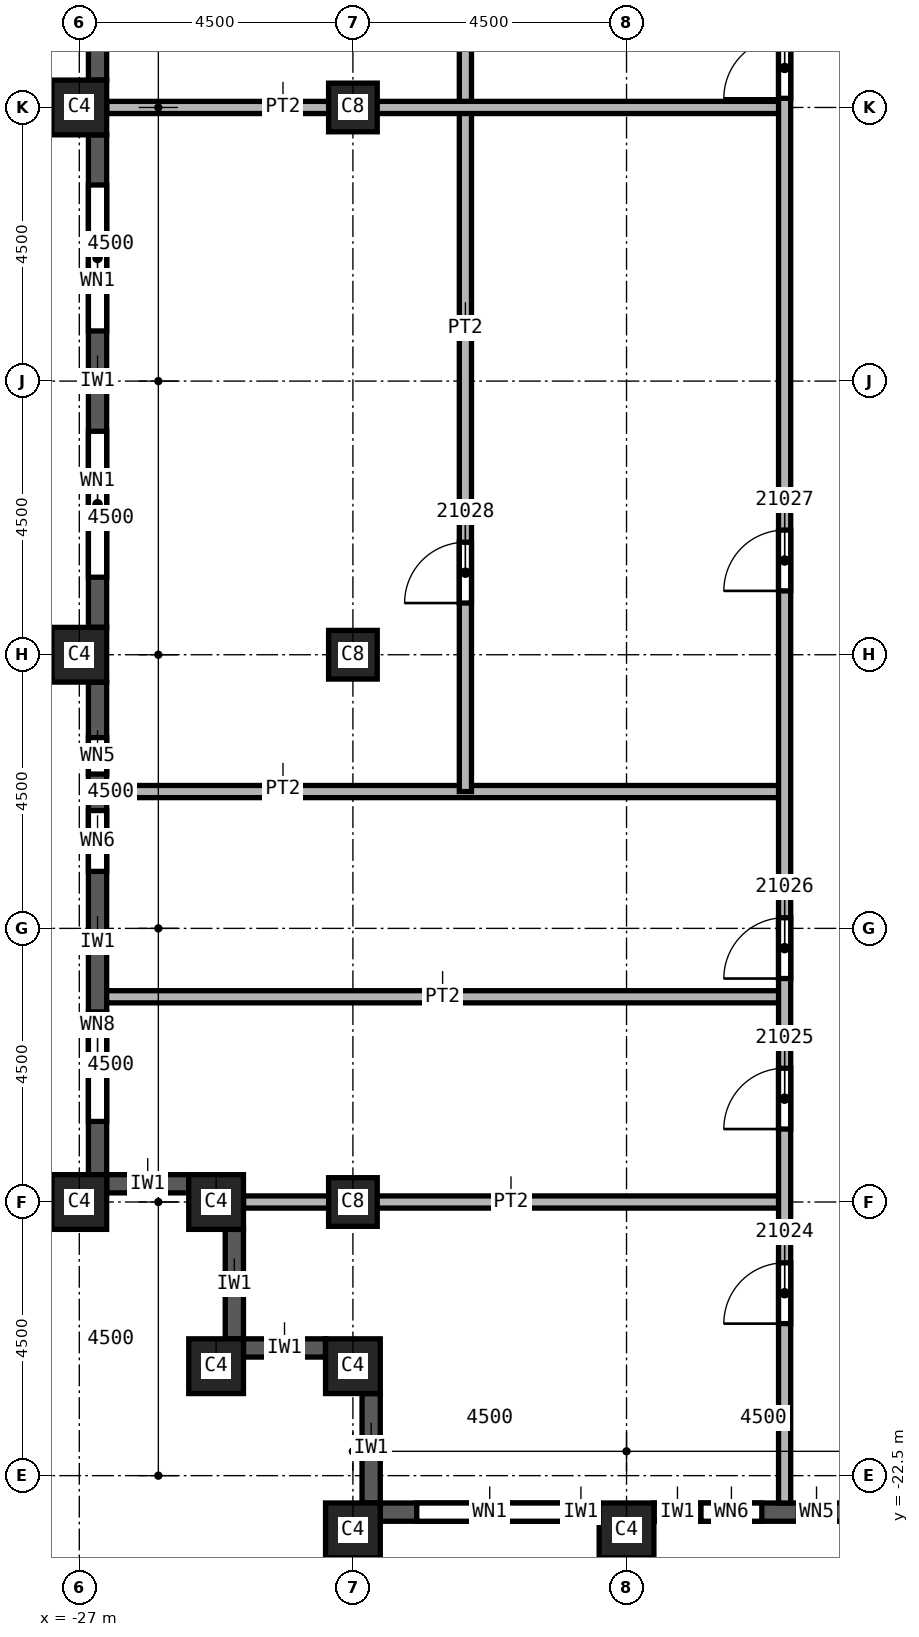
"""IFC4 building model, lengths in metres.
Left out: names, types, materials, properties, quantities, classifications, styles, units other than length and angle.
Written with IfcOpenShell. Run it as: python <this file> out.ifc"""

import sys

from ifc_helpers import new_model, si_unit, direction, frame, frame_2d, origin, origin_2d, place, context, subcontext, project, spatial, rectangle, extrude, element, fill, save


model = new_model("IFC4")
c1 = context("Model", 3, precision=1e-05, world=origin(), true_north=direction((0.0, 1.0)))
c2 = subcontext(c1, "Body", "Model", "MODEL_VIEW")
j1 = project(units=[si_unit("LENGTHUNIT", "METRE"), si_unit("PLANEANGLEUNIT", "RADIAN")], contexts=[c1])
p1 = place(None, origin())
s1 = spatial("IfcSite", under=j1, at=p1, CompositionType="ELEMENT")
p2 = place(p1, origin())
s2 = spatial("IfcBuilding", under=s1, at=p2, CompositionType="ELEMENT")
p3 = place(p2, frame((0.0, 0.0, 300.0)))
s3 = spatial("IfcBuildingStorey", under=s2, at=p3, CompositionType="ELEMENT", Elevation=300.0)
for number, where, z_axis, x_axis in (
    (1, (-22.5, 0.0, 0.0), (0.0, 0.0, 1.0), (1.0, 0.0, 0.0)),
    (2, (-22.5, -9.0, 0.0), (0.0, 0.0, 1.0), (1.0, 0.0, 0.0)),
    (3, (-22.5, -18.0, 0.0), (0.0, 0.0, 1.0), (1.0, 0.0, 0.0)),
):
    element("IfcColumn", number, at=place(p3, frame(where, z_axis=z_axis, x_axis=x_axis)), inside=s3, PredefinedType="COLUMN", context=c2, shape_type="SweptSolid", body=[
        extrude(rectangle(XDim=0.8, YDim=0.8, at=origin_2d()), origin(), (0.0, 0.0, 1.0), 3.74),
    ])
for number, where, z_axis, x_axis in (
    (4, (-18.0, -23.4, 0.0), (0.0, 0.0, 1.0), (1.0, 0.0, 0.0)),
    (5, (-22.5, -23.4, 0.0), (0.0, 0.0, 1.0), (1.0, 0.0, 0.0)),
    (6, (-27.0, 0.0, 0.0), (0.0, 0.0, 1.0), (0.0, 1.0, 0.0)),
    (7, (-27.0, -9.0, 0.0), (0.0, 0.0, 1.0), (0.0, 1.0, 0.0)),
    (8, (-27.0, -18.0, 0.0), (0.0, 0.0, 1.0), (0.0, 1.0, 0.0)),
    (9, (-22.5, -20.7, 0.0), (0.0, 0.0, 1.0), (1.0, 0.0, 0.0)),
    (10, (-24.75, -20.7, 0.0), (0.0, 0.0, 1.0), (1.0, 0.0, 0.0)),
    (11, (-24.75, -18.0, 0.0), (0.0, 0.0, 1.0), (1.0, 0.0, 0.0)),
):
    element("IfcColumn", number, at=place(p3, frame(where, z_axis=z_axis, x_axis=x_axis)), inside=s3, PredefinedType="COLUMN", context=c2, shape_type="SweptSolid", body=[
        extrude(rectangle(XDim=0.9, YDim=0.9, at=origin_2d()), origin(), (0.0, 0.0, 1.0), 3.74),
    ])
p4 = place(p3, frame((-26.7, 8.55, 0.0), z_axis=(0.0, 0.0, 1.0), x_axis=(0.0, -1.0, 0.0)))
e12 = element("IfcWall", 12, at=p4, inside=s3, PredefinedType="SOLIDWALL", context=c2, shape_type="SweptSolid", body=[
    extrude(rectangle(XDim=8.1, YDim=0.3, at=frame_2d((4.05, 0.0))), origin(), (0.0, 0.0, 1.0), 3.14),
])
p5 = place(p4, frame((4.875, 0.0, 0.8)))
e13 = element("IfcOpeningElement", 13, at=p5, cuts=e12, PredefinedType="OPENING", context=c2, shape_type="SweptSolid", body=[
    extrude(rectangle(XDim=2.4, YDim=1.95, at=frame_2d((1.2, 0.975))), frame((0.0, 0.15, 0.0), z_axis=(0.0, -1.0, 0.0), x_axis=(1.0, 0.0, 0.0)), (0.0, 0.0, 1.0), 0.3),
])
p6 = place(p4, frame((0.913, 0.0, 0.8)))
e14 = element("IfcOpeningElement", 14, at=p6, cuts=e12, PredefinedType="OPENING", context=c2, shape_type="SweptSolid", body=[
    extrude(rectangle(XDim=0.6, YDim=1.95, at=frame_2d((0.3, 0.975))), frame((0.0, 0.15, 0.0), z_axis=(0.0, -1.0, 0.0), x_axis=(1.0, 0.0, 0.0)), (0.0, 0.0, 1.0), 0.3),
])
p7 = place(p4, frame((2.113, 0.0, 0.8)))
e15 = element("IfcOpeningElement", 15, at=p7, cuts=e12, PredefinedType="OPENING", context=c2, shape_type="SweptSolid", body=[
    extrude(rectangle(XDim=1.0, YDim=1.95, at=frame_2d((0.5, 0.975))), frame((0.0, 0.15, 0.0), z_axis=(0.0, -1.0, 0.0), x_axis=(1.0, 0.0, 0.0)), (0.0, 0.0, 1.0), 0.3),
])
p8 = place(p3, frame((-26.7, -0.45, 0.0), z_axis=(0.0, 0.0, 1.0), x_axis=(0.0, -1.0, 0.0)))
e16 = element("IfcWall", 16, at=p8, inside=s3, PredefinedType="SOLIDWALL", context=c2, shape_type="SweptSolid", body=[
    extrude(rectangle(XDim=8.1, YDim=0.3, at=frame_2d((4.05, 0.0))), origin(), (0.0, 0.0, 1.0), 3.14),
])
p9 = place(p8, frame((0.825, 0.0, 0.8)))
e17 = element("IfcOpeningElement", 17, at=p9, cuts=e16, PredefinedType="OPENING", context=c2, shape_type="SweptSolid", body=[
    extrude(rectangle(XDim=2.4, YDim=1.95, at=frame_2d((1.2, 0.975))), frame((0.0, 0.15, 0.0), z_axis=(0.0, -1.0, 0.0), x_axis=(1.0, 0.0, 0.0)), (0.0, 0.0, 1.0), 0.3),
])
p10 = place(p8, frame((4.875, 0.0, 0.8)))
e18 = element("IfcOpeningElement", 18, at=p10, cuts=e16, PredefinedType="OPENING", context=c2, shape_type="SweptSolid", body=[
    extrude(rectangle(XDim=2.4, YDim=1.95, at=frame_2d((1.2, 0.975))), frame((0.0, 0.15, 0.0), z_axis=(0.0, -1.0, 0.0), x_axis=(1.0, 0.0, 0.0)), (0.0, 0.0, 1.0), 0.3),
])
p11 = place(p3, frame((-26.7, -9.45, 0.0), z_axis=(0.0, 0.0, 1.0), x_axis=(0.0, -1.0, 0.0)))
e19 = element("IfcWall", 19, at=p11, inside=s3, PredefinedType="SOLIDWALL", context=c2, shape_type="SweptSolid", body=[
    extrude(rectangle(XDim=8.1, YDim=0.3, at=frame_2d((4.05, 0.0))), origin(), (0.0, 0.0, 1.0), 3.14),
])
p12 = place(p11, frame((0.913, 0.0, 0.8)))
e20 = element("IfcOpeningElement", 20, at=p12, cuts=e19, PredefinedType="OPENING", context=c2, shape_type="SweptSolid", body=[
    extrude(rectangle(XDim=0.6, YDim=1.95, at=frame_2d((0.3, 0.975))), frame((0.0, 0.15, 0.0), z_axis=(0.0, -1.0, 0.0), x_axis=(1.0, 0.0, 0.0)), (0.0, 0.0, 1.0), 0.3),
])
p13 = place(p11, frame((2.113, 0.0, 0.8)))
e21 = element("IfcOpeningElement", 21, at=p13, cuts=e19, PredefinedType="OPENING", context=c2, shape_type="SweptSolid", body=[
    extrude(rectangle(XDim=1.0, YDim=1.95, at=frame_2d((0.5, 0.975))), frame((0.0, 0.15, 0.0), z_axis=(0.0, -1.0, 0.0), x_axis=(1.0, 0.0, 0.0)), (0.0, 0.0, 1.0), 0.3),
])
p14 = place(p11, frame((5.425, 0.0, 0.8)))
e22 = element("IfcOpeningElement", 22, at=p14, cuts=e19, PredefinedType="OPENING", context=c2, shape_type="SweptSolid", body=[
    extrude(rectangle(XDim=1.8, YDim=1.95, at=frame_2d((0.9, 0.975))), frame((0.0, 0.15, 0.0), z_axis=(0.0, -1.0, 0.0), x_axis=(1.0, 0.0, 0.0)), (0.0, 0.0, 1.0), 0.3),
])
p15 = place(p3, frame((-26.55, -17.7, 0.0), z_axis=(0.0, 0.0, 1.0), x_axis=(1.0, 0.0, 0.0)))
e23 = element("IfcWall", 23, at=p15, inside=s3, PredefinedType="SOLIDWALL", context=c2, shape_type="SweptSolid", body=[
    extrude(rectangle(XDim=1.35, YDim=0.3, at=frame_2d((0.675, 0.0))), origin(), (0.0, 0.0, 1.0), 3.14),
])
p16 = place(p3, frame((-24.45, -18.45, 0.0), z_axis=(0.0, 0.0, 1.0), x_axis=(0.0, -1.0, 0.0)))
e24 = element("IfcWall", 24, at=p16, inside=s3, PredefinedType="SOLIDWALL", context=c2, shape_type="SweptSolid", body=[
    extrude(rectangle(XDim=1.8, YDim=0.3, at=frame_2d((0.9, 0.0))), origin(), (0.0, 0.0, 1.0), 3.14),
])
p17 = place(p3, frame((-24.3, -20.4, 0.0), z_axis=(0.0, 0.0, 1.0), x_axis=(1.0, 0.0, 0.0)))
e25 = element("IfcWall", 25, at=p17, inside=s3, PredefinedType="SOLIDWALL", context=c2, shape_type="SweptSolid", body=[
    extrude(rectangle(XDim=1.35, YDim=0.3, at=frame_2d((0.675, 0.0))), origin(), (0.0, 0.0, 1.0), 3.14),
])
p18 = place(p3, frame((-22.2, -21.15, 0.0), z_axis=(0.0, 0.0, 1.0), x_axis=(0.0, -1.0, 0.0)))
e26 = element("IfcWall", 26, at=p18, inside=s3, PredefinedType="SOLIDWALL", context=c2, shape_type="SweptSolid", body=[
    extrude(rectangle(XDim=1.8, YDim=0.3, at=frame_2d((0.9, 0.0))), origin(), (0.0, 0.0, 1.0), 3.14),
])
p19 = place(p3, frame((-22.05, -23.1, 0.0), z_axis=(0.0, 0.0, 1.0), x_axis=(1.0, 0.0, 0.0)))
e27 = element("IfcWall", 27, at=p19, inside=s3, PredefinedType="SOLIDWALL", context=c2, shape_type="SweptSolid", body=[
    extrude(rectangle(XDim=3.6, YDim=0.3, at=frame_2d((1.8, 0.0))), origin(), (0.0, 0.0, 1.0), 3.14),
])
p20 = place(p19, frame((0.6, 0.0, 0.8)))
e28 = element("IfcOpeningElement", 28, at=p20, cuts=e27, PredefinedType="OPENING", context=c2, shape_type="SweptSolid", body=[
    extrude(rectangle(XDim=2.4, YDim=1.95, at=frame_2d((1.2, 0.975))), frame((0.0, 0.15, 0.0), z_axis=(0.0, -1.0, 0.0), x_axis=(1.0, 0.0, 0.0)), (0.0, 0.0, 1.0), 0.3),
])
p21 = place(p3, frame((-17.55, -23.1, 0.0), z_axis=(0.0, 0.0, 1.0), x_axis=(1.0, 0.0, 0.0)))
e29 = element("IfcWall", 29, at=p21, inside=s3, PredefinedType="SOLIDWALL", context=c2, shape_type="SweptSolid", body=[
    extrude(rectangle(XDim=3.6, YDim=0.3, at=frame_2d((1.8, 0.0))), origin(), (0.0, 0.0, 1.0), 3.14),
])
p22 = place(p21, frame((0.775, 0.0, 0.8)))
e30 = element("IfcOpeningElement", 30, at=p22, cuts=e29, PredefinedType="OPENING", context=c2, shape_type="SweptSolid", body=[
    extrude(rectangle(XDim=1.0, YDim=1.95, at=frame_2d((0.5, 0.975))), frame((0.0, 0.15, 0.0), z_axis=(0.0, -1.0, 0.0), x_axis=(1.0, 0.0, 0.0)), (0.0, 0.0, 1.0), 0.3),
])
p23 = place(p21, frame((2.375, 0.0, 0.8)))
e31 = element("IfcOpeningElement", 31, at=p23, cuts=e29, PredefinedType="OPENING", context=c2, shape_type="SweptSolid", body=[
    extrude(rectangle(XDim=0.6, YDim=1.95, at=frame_2d((0.3, 0.975))), frame((0.0, 0.15, 0.0), z_axis=(0.0, -1.0, 0.0), x_axis=(1.0, 0.0, 0.0)), (0.0, 0.0, 1.0), 0.3),
])
for number, where, z_axis, x_axis in (
    (32, (-26.55, -14.625, 0.0), (0.0, 0.0, 1.0), (1.0, 0.0, 0.0)),
    (33, (-26.55, -11.25, 0.0), (0.0, 0.0, 1.0), (1.0, 0.0, 0.0)),
):
    element("IfcWall", number, at=place(p3, frame(where, z_axis=z_axis, x_axis=x_axis)), inside=s3, PredefinedType="PARTITIONING", context=c2, shape_type="SweptSolid", body=[
        extrude(rectangle(XDim=11.15, YDim=0.2, at=frame_2d((5.575, 0.0))), origin(), (0.0, 0.0, 1.0), 3.74),
    ])
p24 = place(p3, frame((-24.3, -18.0, 0.0), z_axis=(0.0, 0.0, 1.0), x_axis=(1.0, 0.0, 0.0)))
e34 = element("IfcWall", 34, at=p24, inside=s3, PredefinedType="PARTITIONING", context=c2, shape_type="SweptSolid", body=[
    extrude(rectangle(XDim=8.9, YDim=0.2, at=frame_2d((4.45, 0.0))), origin(), (0.0, 0.0, 1.0), 3.74),
])
p25 = place(p3, frame((-20.65, -11.25, 0.0), z_axis=(0.0, 0.0, 1.0), x_axis=(0.0, 1.0, 0.0)))
e35 = element("IfcWall", 35, at=p25, inside=s3, PredefinedType="PARTITIONING", context=c2, shape_type="SweptSolid", body=[
    extrude(rectangle(XDim=18.1, YDim=0.2, at=frame_2d((9.05, 0.0))), origin(), (0.0, 0.0, 1.0), 3.74),
])
p26 = place(p25, frame((16.8, 0.0, 0.0)))
e36 = element("IfcOpeningElement", 36, at=p26, cuts=e35, PredefinedType="OPENING", context=c2, shape_type="SweptSolid", body=[
    extrude(rectangle(XDim=1.0, YDim=2.1, at=frame_2d((0.5, 1.05))), frame((0.0, 0.1, 0.0), z_axis=(0.0, -1.0, 0.0), x_axis=(1.0, 0.0, 0.0)), (0.0, 0.0, 1.0), 0.2),
])
p27 = place(p25, frame((3.1, 0.0, 0.0)))
e37 = element("IfcOpeningElement", 37, at=p27, cuts=e35, PredefinedType="OPENING", context=c2, shape_type="SweptSolid", body=[
    extrude(rectangle(XDim=1.0, YDim=2.1, at=frame_2d((0.5, 1.05))), frame((0.0, 0.1, 0.0), z_axis=(0.0, -1.0, 0.0), x_axis=(1.0, 0.0, 0.0)), (0.0, 0.0, 1.0), 0.2),
])
p28 = place(p3, frame((-15.4, 0.0, 0.0), z_axis=(0.0, 0.0, 1.0), x_axis=(-1.0, 0.0, 0.0)))
e38 = element("IfcWall", 38, at=p28, inside=s3, PredefinedType="PARTITIONING", context=c2, shape_type="SweptSolid", body=[
    extrude(rectangle(XDim=11.15, YDim=0.2, at=frame_2d((5.575, 0.0))), origin(), (0.0, 0.0, 1.0), 3.74),
])
p29 = place(p3, frame((-15.4, -22.95, 0.0), z_axis=(0.0, 0.0, 1.0), x_axis=(0.0, 1.0, 0.0)))
e39 = element("IfcWall", 39, at=p29, inside=s3, PredefinedType="PARTITIONING", context=c2, shape_type="SweptSolid", body=[
    extrude(rectangle(XDim=36.55, YDim=0.2, at=frame_2d((18.275, 0.0))), origin(), (0.0, 0.0, 1.0), 3.74),
])
p30 = place(p29, frame((23.1, 0.0, 0.0)))
e40 = element("IfcOpeningElement", 40, at=p30, cuts=e39, PredefinedType="OPENING", context=c2, shape_type="SweptSolid", body=[
    extrude(rectangle(XDim=1.0, YDim=2.1, at=frame_2d((0.5, 1.05))), frame((0.0, 0.1, 0.0), z_axis=(0.0, -1.0, 0.0), x_axis=(1.0, 0.0, 0.0)), (0.0, 0.0, 1.0), 0.2),
])
p31 = place(p29, frame((34.35, 0.0, 0.0)))
e41 = element("IfcOpeningElement", 41, at=p31, cuts=e39, PredefinedType="OPENING", context=c2, shape_type="SweptSolid", body=[
    extrude(rectangle(XDim=1.0, YDim=2.1, at=frame_2d((0.5, 1.05))), frame((0.0, 0.1, 0.0), z_axis=(0.0, -1.0, 0.0), x_axis=(1.0, 0.0, 0.0)), (0.0, 0.0, 1.0), 0.2),
])
p32 = place(p29, frame((2.95, 0.0, 0.0)))
e42 = element("IfcOpeningElement", 42, at=p32, cuts=e39, PredefinedType="OPENING", context=c2, shape_type="SweptSolid", body=[
    extrude(rectangle(XDim=1.0, YDim=2.1, at=frame_2d((0.5, 1.05))), frame((0.0, 0.1, 0.0), z_axis=(0.0, -1.0, 0.0), x_axis=(1.0, 0.0, 0.0)), (0.0, 0.0, 1.0), 0.2),
])
p33 = place(p29, frame((6.15, 0.0, 0.0)))
e43 = element("IfcOpeningElement", 43, at=p33, cuts=e39, PredefinedType="OPENING", context=c2, shape_type="SweptSolid", body=[
    extrude(rectangle(XDim=1.0, YDim=2.1, at=frame_2d((0.5, 1.05))), frame((0.0, 0.1, 0.0), z_axis=(0.0, -1.0, 0.0), x_axis=(1.0, 0.0, 0.0)), (0.0, 0.0, 1.0), 0.2),
])
p34 = place(p29, frame((8.625, 0.0, 0.0)))
e44 = element("IfcOpeningElement", 44, at=p34, cuts=e39, PredefinedType="OPENING", context=c2, shape_type="SweptSolid", body=[
    extrude(rectangle(XDim=1.0, YDim=2.1, at=frame_2d((0.5, 1.05))), frame((0.0, 0.1, 0.0), z_axis=(0.0, -1.0, 0.0), x_axis=(1.0, 0.0, 0.0)), (0.0, 0.0, 1.0), 0.2),
])
p35 = place(p29, frame((15.0, 0.0, 0.0)))
e45 = element("IfcOpeningElement", 45, at=p35, cuts=e39, PredefinedType="OPENING", context=c2, shape_type="SweptSolid", body=[
    extrude(rectangle(XDim=1.0, YDim=2.1, at=frame_2d((0.5, 1.05))), frame((0.0, 0.1, 0.0), z_axis=(0.0, -1.0, 0.0), x_axis=(1.0, 0.0, 0.0)), (0.0, 0.0, 1.0), 0.2),
])
p36 = place(p9, origin())
e46 = element("IfcWindow", 46, at=p36, inside=s3, PartitioningType="SINGLE_PANEL", PredefinedType="WINDOW", context=c2, shape_type="SweptSolid", body=[
    extrude(rectangle(XDim=2.4, YDim=1.95, at=frame_2d((1.2, 0.975))), frame((0.0, 0.03, 0.0), z_axis=(0.0, -1.0, 0.0), x_axis=(1.0, 0.0, 0.0)), (0.0, 0.0, 1.0), 0.06),
])
fill(e17, e46)
p37 = place(p10, origin())
e47 = element("IfcWindow", 47, at=p37, inside=s3, PartitioningType="SINGLE_PANEL", PredefinedType="WINDOW", context=c2, shape_type="SweptSolid", body=[
    extrude(rectangle(XDim=2.4, YDim=1.95, at=frame_2d((1.2, 0.975))), frame((0.0, 0.03, 0.0), z_axis=(0.0, -1.0, 0.0), x_axis=(1.0, 0.0, 0.0)), (0.0, 0.0, 1.0), 0.06),
])
fill(e18, e47)
p38 = place(p20, origin())
e48 = element("IfcWindow", 48, at=p38, inside=s3, PartitioningType="SINGLE_PANEL", PredefinedType="WINDOW", context=c2, shape_type="SweptSolid", body=[
    extrude(rectangle(XDim=2.4, YDim=1.95, at=frame_2d((1.2, 0.975))), frame((0.0, 0.03, 0.0), z_axis=(0.0, -1.0, 0.0), x_axis=(1.0, 0.0, 0.0)), (0.0, 0.0, 1.0), 0.06),
])
fill(e28, e48)
p39 = place(p30, origin())
e49 = element("IfcDoor", 49, at=p39, inside=s3, OperationType="SINGLE_SWING_RIGHT", PredefinedType="DOOR", context=c2, shape_type="SweptSolid", body=[
    extrude(rectangle(XDim=1.0, YDim=2.1, at=frame_2d((0.5, 1.05))), frame((0.0, 0.025, 0.0), z_axis=(0.0, -1.0, 0.0), x_axis=(1.0, 0.0, 0.0)), (0.0, 0.0, 1.0), 0.05),
])
fill(e40, e49)
p40 = place(p32, origin())
e50 = element("IfcDoor", 50, at=p40, inside=s3, OperationType="SINGLE_SWING_LEFT", PredefinedType="DOOR", context=c2, shape_type="SweptSolid", body=[
    extrude(rectangle(XDim=1.0, YDim=2.1, at=frame_2d((0.5, 1.05))), frame((0.0, 0.025, 0.0), z_axis=(0.0, -1.0, 0.0), x_axis=(1.0, 0.0, 0.0)), (0.0, 0.0, 1.0), 0.05),
])
fill(e42, e50)
p41 = place(p33, origin())
e51 = element("IfcDoor", 51, at=p41, inside=s3, OperationType="SINGLE_SWING_RIGHT", PredefinedType="DOOR", context=c2, shape_type="SweptSolid", body=[
    extrude(rectangle(XDim=1.0, YDim=2.1, at=frame_2d((0.5, 1.05))), frame((0.0, 0.025, 0.0), z_axis=(0.0, -1.0, 0.0), x_axis=(1.0, 0.0, 0.0)), (0.0, 0.0, 1.0), 0.05),
])
fill(e43, e51)
p42 = place(p34, origin())
e52 = element("IfcDoor", 52, at=p42, inside=s3, OperationType="SINGLE_SWING_LEFT", PredefinedType="DOOR", context=c2, shape_type="SweptSolid", body=[
    extrude(rectangle(XDim=1.0, YDim=2.1, at=frame_2d((0.5, 1.05))), frame((0.0, 0.025, 0.0), z_axis=(0.0, -1.0, 0.0), x_axis=(1.0, 0.0, 0.0)), (0.0, 0.0, 1.0), 0.05),
])
fill(e44, e52)
p43 = place(p35, origin())
e53 = element("IfcDoor", 53, at=p43, inside=s3, OperationType="SINGLE_SWING_RIGHT", PredefinedType="DOOR", context=c2, shape_type="SweptSolid", body=[
    extrude(rectangle(XDim=1.0, YDim=2.1, at=frame_2d((0.5, 1.05))), frame((0.0, 0.025, 0.0), z_axis=(0.0, -1.0, 0.0), x_axis=(1.0, 0.0, 0.0)), (0.0, 0.0, 1.0), 0.05),
])
fill(e45, e53)
p44 = place(p27, origin())
e54 = element("IfcDoor", 54, at=p44, inside=s3, OperationType="SINGLE_SWING_LEFT", PredefinedType="DOOR", context=c2, shape_type="SweptSolid", body=[
    extrude(rectangle(XDim=1.0, YDim=2.1, at=frame_2d((0.5, 1.05))), frame((0.0, 0.025, 0.0), z_axis=(0.0, -1.0, 0.0), x_axis=(1.0, 0.0, 0.0)), (0.0, 0.0, 1.0), 0.05),
])
fill(e37, e54)
p45 = place(p12, origin())
e55 = element("IfcWindow", 55, at=p45, inside=s3, PartitioningType="SINGLE_PANEL", PredefinedType="WINDOW", context=c2, shape_type="SweptSolid", body=[
    extrude(rectangle(XDim=0.6, YDim=1.95, at=frame_2d((0.3, 0.975))), frame((0.0, 0.03, 0.0), z_axis=(0.0, -1.0, 0.0), x_axis=(1.0, 0.0, 0.0)), (0.0, 0.0, 1.0), 0.06),
])
fill(e20, e55)
p46 = place(p13, origin())
e56 = element("IfcWindow", 56, at=p46, inside=s3, PartitioningType="SINGLE_PANEL", PredefinedType="WINDOW", context=c2, shape_type="SweptSolid", body=[
    extrude(rectangle(XDim=1.0, YDim=1.95, at=frame_2d((0.5, 0.975))), frame((0.0, 0.03, 0.0), z_axis=(0.0, -1.0, 0.0), x_axis=(1.0, 0.0, 0.0)), (0.0, 0.0, 1.0), 0.06),
])
fill(e21, e56)
p47 = place(p14, origin())
e57 = element("IfcWindow", 57, at=p47, inside=s3, PartitioningType="SINGLE_PANEL", PredefinedType="WINDOW", context=c2, shape_type="SweptSolid", body=[
    extrude(rectangle(XDim=1.8, YDim=1.95, at=frame_2d((0.9, 0.975))), frame((0.0, 0.03, 0.0), z_axis=(0.0, -1.0, 0.0), x_axis=(1.0, 0.0, 0.0)), (0.0, 0.0, 1.0), 0.06),
])
fill(e22, e57)
p48 = place(p22, origin())
e58 = element("IfcWindow", 58, at=p48, inside=s3, PartitioningType="SINGLE_PANEL", PredefinedType="WINDOW", context=c2, shape_type="SweptSolid", body=[
    extrude(rectangle(XDim=1.0, YDim=1.95, at=frame_2d((0.5, 0.975))), frame((0.0, 0.03, 0.0), z_axis=(0.0, -1.0, 0.0), x_axis=(1.0, 0.0, 0.0)), (0.0, 0.0, 1.0), 0.06),
])
fill(e30, e58)
p49 = place(p23, origin())
e59 = element("IfcWindow", 59, at=p49, inside=s3, PartitioningType="SINGLE_PANEL", PredefinedType="WINDOW", context=c2, shape_type="SweptSolid", body=[
    extrude(rectangle(XDim=0.6, YDim=1.95, at=frame_2d((0.3, 0.975))), frame((0.0, 0.03, 0.0), z_axis=(0.0, -1.0, 0.0), x_axis=(1.0, 0.0, 0.0)), (0.0, 0.0, 1.0), 0.06),
])
fill(e31, e59)
save(model, sys.argv[1])
